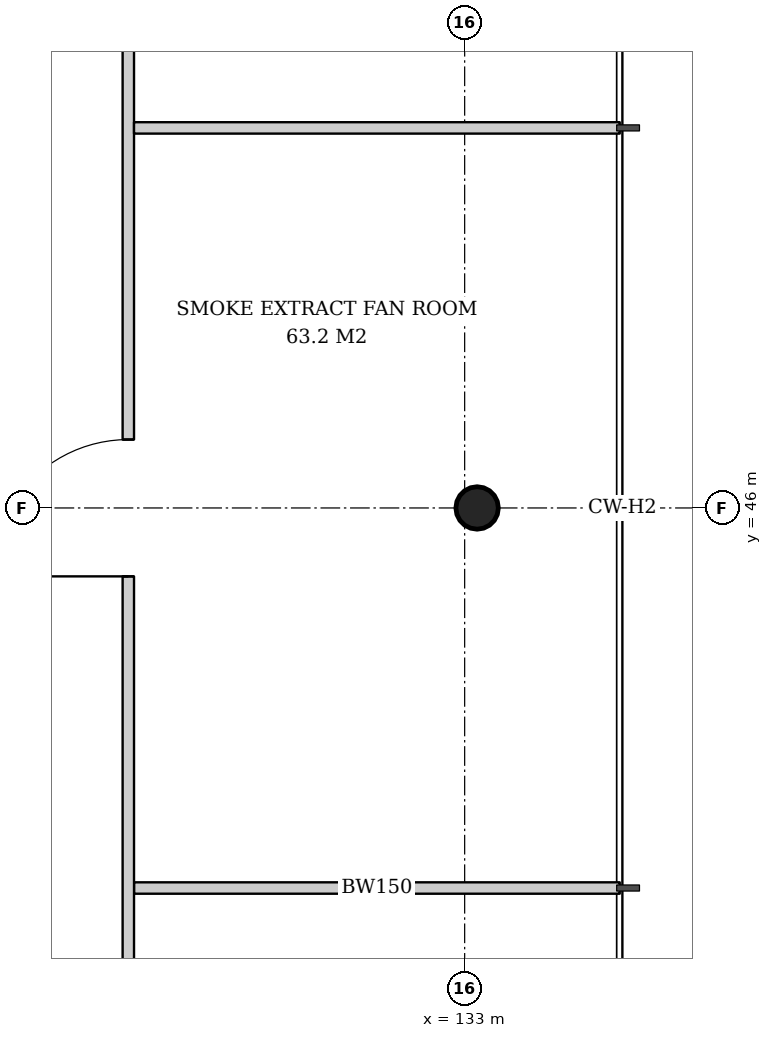
"""IFC4 building model, lengths in metres.
Left out: names, types, materials, properties, quantities, classifications, styles, units other than length and angle.
Written with IfcOpenShell. Run it as: python <this file> out.ifc"""

import sys

from ifc_helpers import new_model, si_unit, direction, frame, frame_2d, origin, origin_2d, place, context, subcontext, project, spatial, rectangle, hollow_circle, extrude, element, fill, save


model = new_model("IFC4")
c1 = context("Model", 3, precision=1e-05, world=origin(), true_north=direction((0.0, 1.0)))
c2 = subcontext(c1, "Body", "Model", "MODEL_VIEW")
j1 = project(units=[si_unit("LENGTHUNIT", "METRE"), si_unit("PLANEANGLEUNIT", "RADIAN")], contexts=[c1])
p1 = place(None, origin())
s1 = spatial("IfcSite", under=j1, at=p1, CompositionType="ELEMENT")
p2 = place(p1, origin())
s2 = spatial("IfcBuilding", under=s1, at=p2, CompositionType="ELEMENT")
p3 = place(p2, frame((0.0, 0.0, 85.6)))
s3 = spatial("IfcBuildingStorey", under=s2, at=p3, CompositionType="ELEMENT", Elevation=85.6)
p4 = place(p3, frame((133.216, 46.0, 0.0), z_axis=(-0.043072300418, 0.0, 0.999071957837), x_axis=(0.0, -1.0, 0.0)))
e1 = element("IfcColumn", 1, at=p4, inside=s3, PredefinedType="COLUMN", context=c2, shape_type="SweptSolid", body=[
    extrude(hollow_circle(Radius=0.28, WallThickness=0.02, at=origin_2d()), origin(), (0.0, 0.0, 1.0), 3.803),
])
p5 = place(p3, frame((128.65, 41.0, 0.0), z_axis=(0.0, 0.0, 1.0), x_axis=(1.0, 0.0, 0.0)))
e2 = element("IfcWall", 2, at=p5, inside=s3, PredefinedType="SOLIDWALL", context=c2, shape_type="SweptSolid", body=[
    extrude(rectangle(XDim=6.39, YDim=0.15, at=frame_2d((3.195, 0.0))), origin(), (0.0, 0.0, 1.0), 3.0),
])
p6 = place(p3, frame((128.575, 34.35, 0.0), z_axis=(0.0, 0.0, 1.0), x_axis=(0.0, 1.0, 0.0)))
e3 = element("IfcWall", 3, at=p6, inside=s3, PredefinedType="SOLIDWALL", context=c2, shape_type="SweptSolid", body=[
    extrude(rectangle(XDim=23.15, YDim=0.15, at=frame_2d((11.575, 0.0))), origin(), (0.0, 0.0, 1.0), 2.9),
])
p7 = place(p6, frame((2.462, 0.0, 0.0)))
e4 = element("IfcOpeningElement", 4, at=p7, cuts=e3, PredefinedType="OPENING", context=c2, shape_type="SweptSolid", body=[
    extrude(rectangle(XDim=1.8, YDim=2.4, at=frame_2d((0.9, 1.2))), frame((0.0, 0.085, 0.0), z_axis=(0.0, -1.0, 0.0), x_axis=(1.0, 0.0, 0.0)), (0.0, 0.0, 1.0), 0.17),
])
p8 = place(p6, frame((10.75, 0.0, 0.0)))
e5 = element("IfcOpeningElement", 5, at=p8, cuts=e3, PredefinedType="OPENING", context=c2, shape_type="SweptSolid", body=[
    extrude(rectangle(XDim=1.8, YDim=2.4, at=frame_2d((0.9, 1.2))), frame((0.0, 0.085, 0.0), z_axis=(0.0, -1.0, 0.0), x_axis=(1.0, 0.0, 0.0)), (0.0, 0.0, 1.0), 0.17),
])
p9 = place(p3, frame((128.65, 51.0, 0.0), z_axis=(0.0, 0.0, 1.0), x_axis=(1.0, 0.0, 0.0)))
e6 = element("IfcWall", 6, at=p9, inside=s3, PredefinedType="SOLIDWALL", context=c2, shape_type="SweptSolid", body=[
    extrude(rectangle(XDim=6.39, YDim=0.15, at=frame_2d((3.195, 0.0))), origin(), (0.0, 0.0, 1.0), 3.2),
])
p10 = place(p8, origin())
e7 = element("IfcDoor", 7, at=p10, inside=s3, OperationType="DOUBLE_DOOR_SINGLE_SWING", PredefinedType="DOOR", context=c2, shape_type="SweptSolid", body=[
    extrude(rectangle(XDim=1.8, YDim=2.4, at=frame_2d((0.9, 1.2))), frame((0.0, 0.025, 0.0), z_axis=(0.0, -1.0, 0.0), x_axis=(1.0, 0.0, 0.0)), (0.0, 0.0, 1.0), 0.05),
])
fill(e5, e7)
save(model, sys.argv[1])
